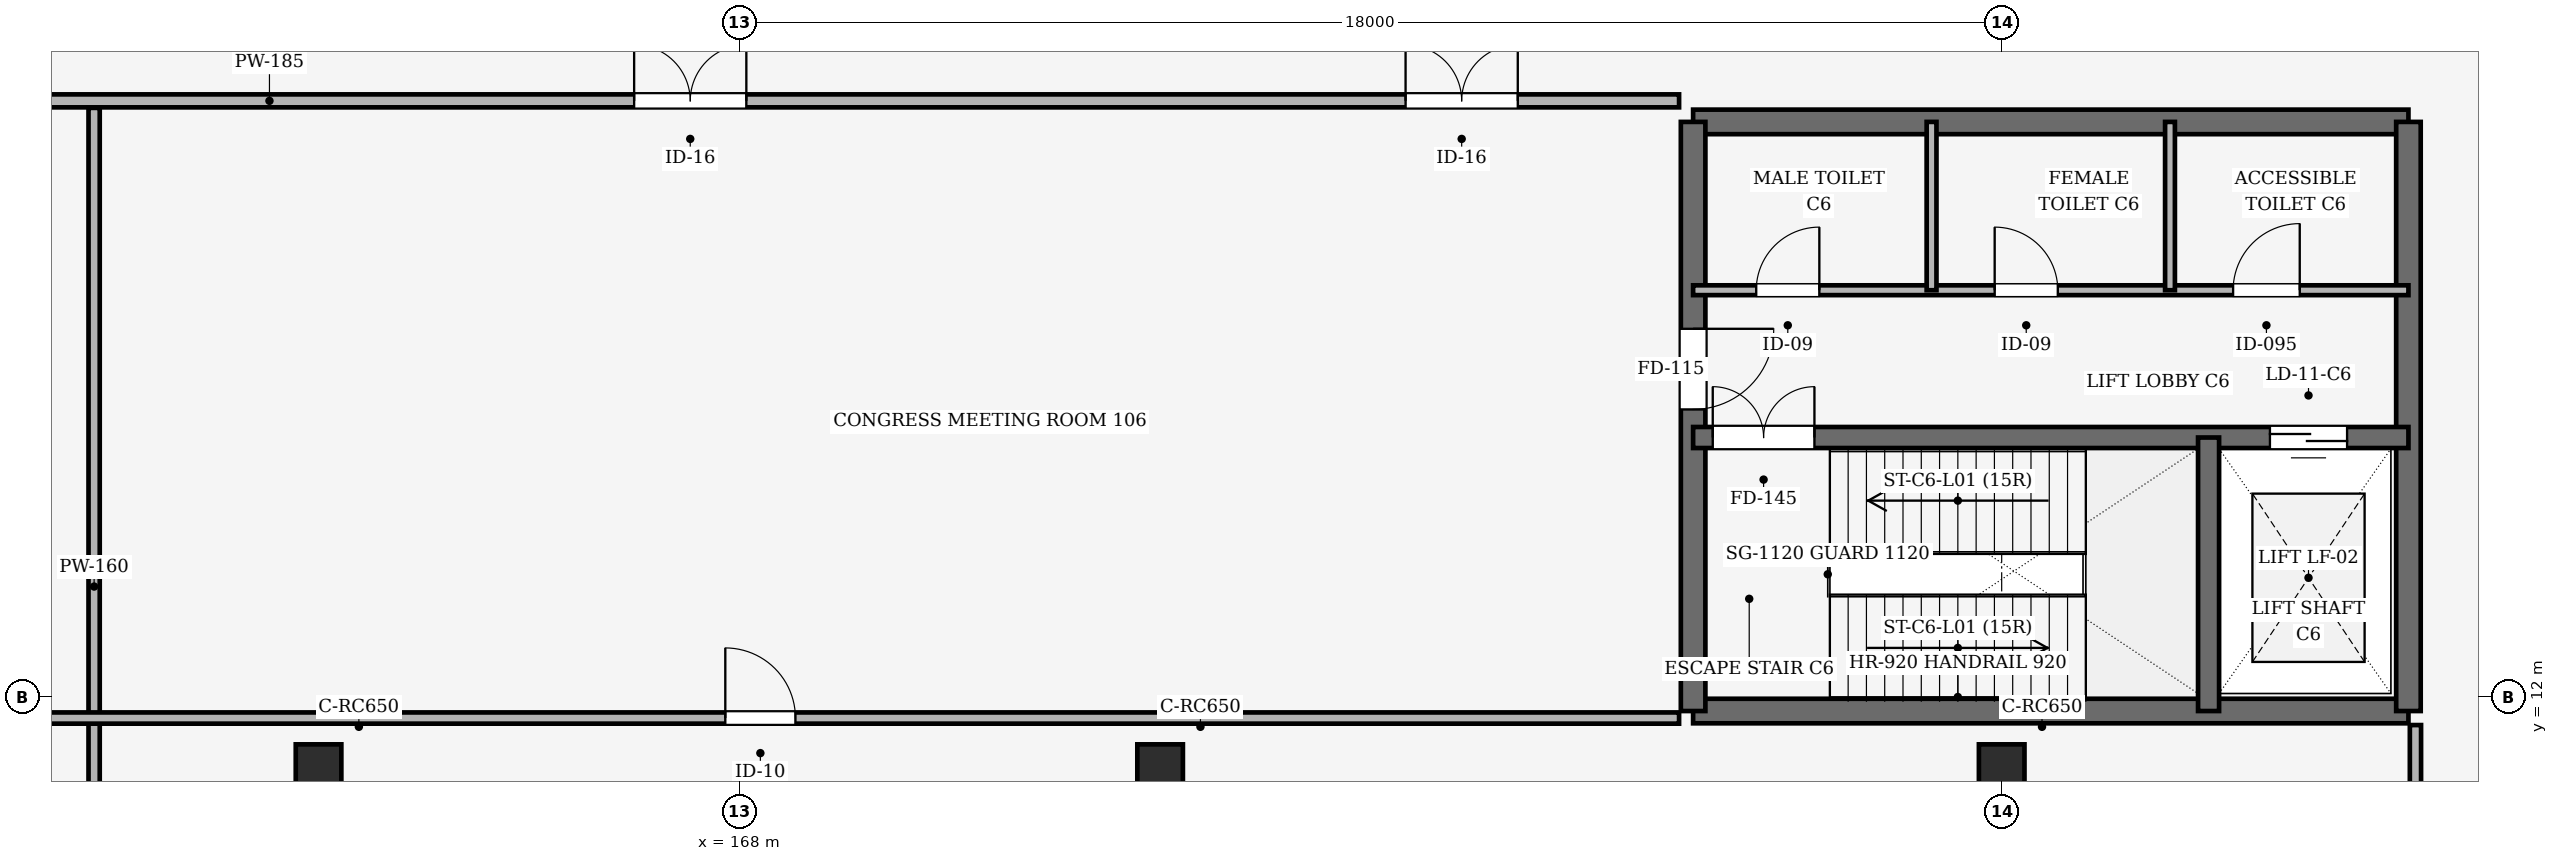
"""IFC4 building model, lengths in metres.
Left out: names, types, materials, properties, quantities, classifications, styles, units other than length and angle.
Written with IfcOpenShell. Run it as: python <this file> out.ifc"""

import sys

from ifc_helpers import new_model, si_unit, direction, frame, frame_2d, origin, origin_2d, place, context, subcontext, project, spatial, rectangle, extrude, element, fill, save


model = new_model("IFC4")
c1 = context("Model", 3, precision=1e-05, world=origin(), true_north=direction((0.0, 1.0)))
c2 = subcontext(c1, "Body", "Model", "MODEL_VIEW")
j1 = project(units=[si_unit("LENGTHUNIT", "METRE"), si_unit("PLANEANGLEUNIT", "RADIAN")], contexts=[c1])
p1 = place(None, origin())
s1 = spatial("IfcSite", under=j1, at=p1, CompositionType="ELEMENT")
p2 = place(p1, origin())
s2 = spatial("IfcBuilding", under=s1, at=p2, CompositionType="ELEMENT")
p3 = place(p2, frame((0.0, 0.0, 5.4)))
s3 = spatial("IfcBuildingStorey", under=s2, at=p3, CompositionType="ELEMENT", Elevation=5.4)
for number, where, z_axis, x_axis in (
    (1, (162.0, 11.0, 0.0), (0.0, 0.0, 1.0), (1.0, 0.0, 0.0)),
    (2, (174.0, 11.0, 0.0), (0.0, 0.0, 1.0), (1.0, 0.0, 0.0)),
    (3, (186.0, 11.0, 0.0), (0.0, 0.0, 1.0), (1.0, 0.0, 0.0)),
):
    element("IfcColumn", number, at=place(p3, frame(where, z_axis=z_axis, x_axis=x_axis)), inside=s3, PredefinedType="COLUMN", context=c2, shape_type="SweptSolid", body=[
        extrude(rectangle(XDim=0.65, YDim=0.65, at=origin_2d()), origin(), (0.0, 0.0, 1.0), 5.4),
    ])
for number, where, z_axis, x_axis in (
    (4, (181.6, 11.8, 0.0), (0.0, 0.0, 1.0), (1.0, 0.0, 0.0)),
    (5, (191.8, 20.2, 0.0), (0.0, 0.0, 1.0), (-1.0, 0.0, 0.0)),
):
    element("IfcWall", number, at=place(p3, frame(where, z_axis=z_axis, x_axis=x_axis)), inside=s3, PredefinedType="SHEAR", context=c2, shape_type="SweptSolid", body=[
        extrude(rectangle(XDim=10.2, YDim=0.35, at=frame_2d((5.1, 0.0))), origin(), (0.0, 0.0, 1.0), 5.4),
    ])
p4 = place(p3, frame((181.6, 20.2, 0.0), z_axis=(0.0, 0.0, 1.0), x_axis=(0.0, -1.0, 0.0)))
e6 = element("IfcWall", 6, at=p4, inside=s3, PredefinedType="SHEAR", context=c2, shape_type="SweptSolid", body=[
    extrude(rectangle(XDim=8.4, YDim=0.35, at=frame_2d((4.2, 0.0))), origin(), (0.0, 0.0, 1.0), 5.4),
])
p5 = place(p4, frame((2.95, 0.0, 0.0)))
e7 = element("IfcOpeningElement", 7, at=p5, cuts=e6, PredefinedType="OPENING", context=c2, shape_type="SweptSolid", body=[
    extrude(rectangle(XDim=1.15, YDim=2.15, at=frame_2d((0.575, 1.075))), frame((0.0, 0.185, 0.0), z_axis=(0.0, -1.0, 0.0), x_axis=(1.0, 0.0, 0.0)), (0.0, 0.0, 1.0), 0.37),
])
p6 = place(p3, frame((191.8, 11.8, 0.0), z_axis=(0.0, 0.0, 1.0), x_axis=(0.0, 1.0, 0.0)))
e8 = element("IfcWall", 8, at=p6, inside=s3, PredefinedType="SHEAR", context=c2, shape_type="SweptSolid", body=[
    extrude(rectangle(XDim=8.4, YDim=0.35, at=frame_2d((4.2, 0.0))), origin(), (0.0, 0.0, 1.0), 5.4),
])
p7 = place(p3, frame((181.6, 15.7, 0.0), z_axis=(0.0, 0.0, 1.0), x_axis=(1.0, 0.0, 0.0)))
e9 = element("IfcWall", 9, at=p7, inside=s3, PredefinedType="SHEAR", context=c2, shape_type="SweptSolid", body=[
    extrude(rectangle(XDim=10.2, YDim=0.3, at=frame_2d((5.1, 0.0))), origin(), (0.0, 0.0, 1.0), 5.4),
])
p8 = place(p7, frame((0.28, 0.0, 0.0)))
e10 = element("IfcOpeningElement", 10, at=p8, cuts=e9, PredefinedType="OPENING", context=c2, shape_type="SweptSolid", body=[
    extrude(rectangle(XDim=1.45, YDim=2.15, at=frame_2d((0.725, 1.075))), frame((0.0, 0.16, 0.0), z_axis=(0.0, -1.0, 0.0), x_axis=(1.0, 0.0, 0.0)), (0.0, 0.0, 1.0), 0.32),
])
p9 = place(p7, frame((8.225, 0.0, 0.0)))
e11 = element("IfcOpeningElement", 11, at=p9, cuts=e9, PredefinedType="OPENING", context=c2, shape_type="SweptSolid", body=[
    extrude(rectangle(XDim=1.1, YDim=2.15, at=frame_2d((0.55, 1.075))), frame((0.0, 0.16, 0.0), z_axis=(0.0, -1.0, 0.0), x_axis=(1.0, 0.0, 0.0)), (0.0, 0.0, 1.0), 0.32),
])
p10 = place(p3, frame((188.95, 11.8, 0.0), z_axis=(0.0, 0.0, 1.0), x_axis=(0.0, 1.0, 0.0)))
e12 = element("IfcWall", 12, at=p10, inside=s3, PredefinedType="SHEAR", context=c2, shape_type="SweptSolid", body=[
    extrude(rectangle(XDim=3.9, YDim=0.3, at=frame_2d((1.95, 0.0))), origin(), (0.0, 0.0, 1.0), 5.4),
])
p11 = place(p3, frame((181.6, 17.8, 0.0), z_axis=(0.0, 0.0, 1.0), x_axis=(1.0, 0.0, 0.0)))
e13 = element("IfcWall", 13, at=p11, inside=s3, PredefinedType="PARTITIONING", context=c2, shape_type="SweptSolid", body=[
    extrude(rectangle(XDim=10.2, YDim=0.14, at=frame_2d((5.1, 0.0))), origin(), (0.0, 0.0, 1.0), 4.325),
])
p12 = place(p11, frame((0.9, 0.0, 0.0)))
e14 = element("IfcOpeningElement", 14, at=p12, cuts=e13, PredefinedType="OPENING", context=c2, shape_type="SweptSolid", body=[
    extrude(rectangle(XDim=0.9, YDim=2.1, at=frame_2d((0.45, 1.05))), frame((0.0, 0.08, 0.0), z_axis=(0.0, -1.0, 0.0), x_axis=(1.0, 0.0, 0.0)), (0.0, 0.0, 1.0), 0.16),
])
p13 = place(p11, frame((4.3, 0.0, 0.0)))
e15 = element("IfcOpeningElement", 15, at=p13, cuts=e13, PredefinedType="OPENING", context=c2, shape_type="SweptSolid", body=[
    extrude(rectangle(XDim=0.9, YDim=2.1, at=frame_2d((0.45, 1.05))), frame((0.0, 0.08, 0.0), z_axis=(0.0, -1.0, 0.0), x_axis=(1.0, 0.0, 0.0)), (0.0, 0.0, 1.0), 0.16),
])
p14 = place(p11, frame((7.7, 0.0, 0.0)))
e16 = element("IfcOpeningElement", 16, at=p14, cuts=e13, PredefinedType="OPENING", context=c2, shape_type="SweptSolid", body=[
    extrude(rectangle(XDim=0.95, YDim=2.1, at=frame_2d((0.475, 1.05))), frame((0.0, 0.08, 0.0), z_axis=(0.0, -1.0, 0.0), x_axis=(1.0, 0.0, 0.0)), (0.0, 0.0, 1.0), 0.16),
])
for number, where, z_axis, x_axis in (
    (17, (185.0, 17.8, 0.0), (0.0, 0.0, 1.0), (0.0, 1.0, 0.0)),
    (18, (188.4, 17.8, 0.0), (0.0, 0.0, 1.0), (0.0, 1.0, 0.0)),
):
    element("IfcWall", number, at=place(p3, frame(where, z_axis=z_axis, x_axis=x_axis)), inside=s3, PredefinedType="PARTITIONING", context=c2, shape_type="SweptSolid", body=[
        extrude(rectangle(XDim=2.4, YDim=0.14, at=frame_2d((1.2, 0.0))), origin(), (0.0, 0.0, 1.0), 4.5),
    ])
p15 = place(p3, frame((137.8, 20.5, 0.0), z_axis=(0.0, 0.0, 1.0), x_axis=(1.0, 0.0, 0.0)))
e19 = element("IfcWall", 19, at=p15, inside=s3, PredefinedType="PARTITIONING", context=c2, shape_type="SweptSolid", body=[
    extrude(rectangle(XDim=43.6, YDim=0.185, at=frame_2d((21.8, 0.0))), origin(), (0.0, 0.0, 1.0), 3.6),
])
p16 = place(p15, frame((5.7, 0.0, 0.0)))
e20 = element("IfcOpeningElement", 20, at=p16, cuts=e19, PredefinedType="OPENING", context=c2, shape_type="SweptSolid", body=[
    extrude(rectangle(XDim=1.6, YDim=2.2, at=frame_2d((0.8, 1.1))), frame((0.0, 0.103, 0.0), z_axis=(0.0, -1.0, 0.0), x_axis=(1.0, 0.0, 0.0)), (0.0, 0.0, 1.0), 0.205),
])
p17 = place(p15, frame((28.7, 0.0, 0.0)))
e21 = element("IfcOpeningElement", 21, at=p17, cuts=e19, PredefinedType="OPENING", context=c2, shape_type="SweptSolid", body=[
    extrude(rectangle(XDim=1.6, YDim=2.2, at=frame_2d((0.8, 1.1))), frame((0.0, 0.103, 0.0), z_axis=(0.0, -1.0, 0.0), x_axis=(1.0, 0.0, 0.0)), (0.0, 0.0, 1.0), 0.205),
])
p18 = place(p15, frame((39.7, 0.0, 0.0)))
e22 = element("IfcOpeningElement", 22, at=p18, cuts=e19, PredefinedType="OPENING", context=c2, shape_type="SweptSolid", body=[
    extrude(rectangle(XDim=1.6, YDim=2.2, at=frame_2d((0.8, 1.1))), frame((0.0, 0.103, 0.0), z_axis=(0.0, -1.0, 0.0), x_axis=(1.0, 0.0, 0.0)), (0.0, 0.0, 1.0), 0.205),
])
p19 = place(p15, frame((16.7, 0.0, 0.0)))
e23 = element("IfcOpeningElement", 23, at=p19, cuts=e19, PredefinedType="OPENING", context=c2, shape_type="SweptSolid", body=[
    extrude(rectangle(XDim=1.6, YDim=2.2, at=frame_2d((0.8, 1.1))), frame((0.0, 0.103, 0.0), z_axis=(0.0, -1.0, 0.0), x_axis=(1.0, 0.0, 0.0)), (0.0, 0.0, 1.0), 0.205),
])
p20 = place(p3, frame((158.8, 0.4, 0.0), z_axis=(0.0, 0.0, 1.0), x_axis=(0.0, 1.0, 0.0)))
e24 = element("IfcWall", 24, at=p20, inside=s3, PredefinedType="PARTITIONING", context=c2, shape_type="SweptSolid", body=[
    extrude(rectangle(XDim=20.0, YDim=0.16, at=frame_2d((10.0, 0.0))), origin(), (0.0, 0.0, 1.0), 3.6),
])
p21 = place(p20, frame((5.0, 0.0, 0.0)))
e25 = element("IfcOpeningElement", 25, at=p21, cuts=e24, PredefinedType="OPENING", context=c2, shape_type="SweptSolid", body=[
    extrude(rectangle(XDim=1.0, YDim=2.15, at=frame_2d((0.5, 1.075))), frame((0.0, 0.09, 0.0), z_axis=(0.0, -1.0, 0.0), x_axis=(1.0, 0.0, 0.0)), (0.0, 0.0, 1.0), 0.18),
])
p22 = place(p3, frame((137.8, 11.7, 0.0), z_axis=(0.0, 0.0, 1.0), x_axis=(1.0, 0.0, 0.0)))
e26 = element("IfcWall", 26, at=p22, inside=s3, PredefinedType="PARTITIONING", context=c2, shape_type="SweptSolid", body=[
    extrude(rectangle(XDim=43.6, YDim=0.16, at=frame_2d((21.8, 0.0))), origin(), (0.0, 0.0, 1.0), 3.6),
])
p23 = place(p22, frame((8.0, 0.0, 0.0)))
e27 = element("IfcOpeningElement", 27, at=p23, cuts=e26, PredefinedType="OPENING", context=c2, shape_type="SweptSolid", body=[
    extrude(rectangle(XDim=1.0, YDim=2.15, at=frame_2d((0.5, 1.075))), frame((0.0, 0.09, 0.0), z_axis=(0.0, -1.0, 0.0), x_axis=(1.0, 0.0, 0.0)), (0.0, 0.0, 1.0), 0.18),
])
p24 = place(p22, frame((30.0, 0.0, 0.0)))
e28 = element("IfcOpeningElement", 28, at=p24, cuts=e26, PredefinedType="OPENING", context=c2, shape_type="SweptSolid", body=[
    extrude(rectangle(XDim=1.0, YDim=2.15, at=frame_2d((0.5, 1.075))), frame((0.0, 0.09, 0.0), z_axis=(0.0, -1.0, 0.0), x_axis=(1.0, 0.0, 0.0)), (0.0, 0.0, 1.0), 0.18),
])
p25 = place(p3, frame((191.9, 0.4, 0.0), z_axis=(0.0, 0.0, 1.0), x_axis=(0.0, 1.0, 0.0)))
e29 = element("IfcWall", 29, at=p25, inside=s3, PredefinedType="PARTITIONING", context=c2, shape_type="SweptSolid", body=[
    extrude(rectangle(XDim=11.2, YDim=0.16, at=frame_2d((5.6, 0.0))), origin(), (0.0, 0.0, 1.0), 3.6),
])
p26 = place(p25, frame((5.0, 0.0, 0.0)))
e30 = element("IfcOpeningElement", 30, at=p26, cuts=e29, PredefinedType="OPENING", context=c2, shape_type="SweptSolid", body=[
    extrude(rectangle(XDim=1.6, YDim=2.2, at=frame_2d((0.8, 1.1))), frame((0.0, 0.09, 0.0), z_axis=(0.0, -1.0, 0.0), x_axis=(1.0, 0.0, 0.0)), (0.0, 0.0, 1.0), 0.18),
])
p27 = place(p5, origin())
e31 = element("IfcDoor", 31, at=p27, inside=s3, OperationType="SINGLE_SWING_LEFT", PredefinedType="DOOR", context=c2, shape_type="SweptSolid", body=[
    extrude(rectangle(XDim=1.15, YDim=2.15, at=frame_2d((0.575, 1.075))), frame((0.0, 0.025, 0.0), z_axis=(0.0, -1.0, 0.0), x_axis=(1.0, 0.0, 0.0)), (0.0, 0.0, 1.0), 0.05),
])
fill(e7, e31)
p28 = place(p8, origin())
e32 = element("IfcDoor", 32, at=p28, inside=s3, OperationType="DOUBLE_DOOR_SINGLE_SWING", PredefinedType="DOOR", context=c2, shape_type="SweptSolid", body=[
    extrude(rectangle(XDim=1.45, YDim=2.15, at=frame_2d((0.725, 1.075))), frame((0.0, 0.025, 0.0), z_axis=(0.0, -1.0, 0.0), x_axis=(1.0, 0.0, 0.0)), (0.0, 0.0, 1.0), 0.05),
])
fill(e10, e32)
p29 = place(p9, origin())
e33 = element("IfcDoor", 33, at=p29, inside=s3, OperationType="DOUBLE_DOOR_SLIDING", PredefinedType="DOOR", context=c2, shape_type="SweptSolid", body=[
    extrude(rectangle(XDim=1.1, YDim=2.15, at=frame_2d((0.55, 1.075))), frame((0.0, 0.025, 0.0), z_axis=(0.0, -1.0, 0.0), x_axis=(1.0, 0.0, 0.0)), (0.0, 0.0, 1.0), 0.05),
])
fill(e11, e33)
p30 = place(p12, origin())
e34 = element("IfcDoor", 34, at=p30, inside=s3, OperationType="SINGLE_SWING_RIGHT", PredefinedType="DOOR", context=c2, shape_type="SweptSolid", body=[
    extrude(rectangle(XDim=0.9, YDim=2.1, at=frame_2d((0.45, 1.05))), frame((0.0, 0.025, 0.0), z_axis=(0.0, -1.0, 0.0), x_axis=(1.0, 0.0, 0.0)), (0.0, 0.0, 1.0), 0.05),
])
fill(e14, e34)
p31 = place(p13, origin())
e35 = element("IfcDoor", 35, at=p31, inside=s3, OperationType="SINGLE_SWING_LEFT", PredefinedType="DOOR", context=c2, shape_type="SweptSolid", body=[
    extrude(rectangle(XDim=0.9, YDim=2.1, at=frame_2d((0.45, 1.05))), frame((0.0, 0.025, 0.0), z_axis=(0.0, -1.0, 0.0), x_axis=(1.0, 0.0, 0.0)), (0.0, 0.0, 1.0), 0.05),
])
fill(e15, e35)
p32 = place(p14, origin())
e36 = element("IfcDoor", 36, at=p32, inside=s3, OperationType="SINGLE_SWING_RIGHT", PredefinedType="DOOR", context=c2, shape_type="SweptSolid", body=[
    extrude(rectangle(XDim=0.95, YDim=2.1, at=frame_2d((0.475, 1.05))), frame((0.0, 0.025, 0.0), z_axis=(0.0, -1.0, 0.0), x_axis=(1.0, 0.0, 0.0)), (0.0, 0.0, 1.0), 0.05),
])
fill(e16, e36)
p33 = place(p17, origin())
e37 = element("IfcDoor", 37, at=p33, inside=s3, OperationType="DOUBLE_DOOR_SINGLE_SWING", PredefinedType="DOOR", context=c2, shape_type="SweptSolid", body=[
    extrude(rectangle(XDim=1.6, YDim=2.2, at=frame_2d((0.8, 1.1))), frame((0.0, 0.025, 0.0), z_axis=(0.0, -1.0, 0.0), x_axis=(1.0, 0.0, 0.0)), (0.0, 0.0, 1.0), 0.05),
])
fill(e21, e37)
p34 = place(p18, origin())
e38 = element("IfcDoor", 38, at=p34, inside=s3, OperationType="DOUBLE_DOOR_SINGLE_SWING", PredefinedType="DOOR", context=c2, shape_type="SweptSolid", body=[
    extrude(rectangle(XDim=1.6, YDim=2.2, at=frame_2d((0.8, 1.1))), frame((0.0, 0.025, 0.0), z_axis=(0.0, -1.0, 0.0), x_axis=(1.0, 0.0, 0.0)), (0.0, 0.0, 1.0), 0.05),
])
fill(e22, e38)
p35 = place(p24, origin())
e39 = element("IfcDoor", 39, at=p35, inside=s3, OperationType="SINGLE_SWING_LEFT", PredefinedType="DOOR", context=c2, shape_type="SweptSolid", body=[
    extrude(rectangle(XDim=1.0, YDim=2.15, at=frame_2d((0.5, 1.075))), frame((0.0, 0.025, 0.0), z_axis=(0.0, -1.0, 0.0), x_axis=(1.0, 0.0, 0.0)), (0.0, 0.0, 1.0), 0.05),
])
fill(e28, e39)
save(model, sys.argv[1])
